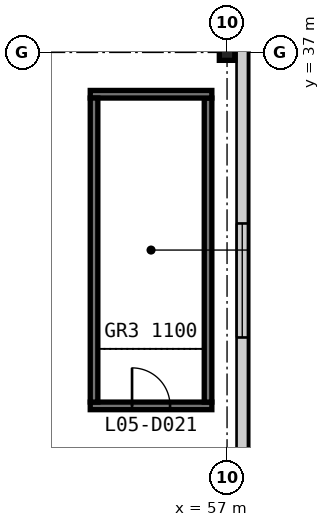
"""IFC4 building model, lengths in metres.
Left out: names, types, materials, properties, quantities, classifications, styles, units other than length and angle.
Written with IfcOpenShell. Run it as: python <this file> out.ifc"""

import sys

from ifc_helpers import new_model, si_unit, direction, frame, frame_2d, origin, origin_2d, place, context, subcontext, project, spatial, rectangle, i_section, extrude, element, fill, save


model = new_model("IFC4")
c1 = context("Model", 3, precision=1e-05, world=origin(), true_north=direction((0.0, 1.0)))
c2 = subcontext(c1, "Body", "Model", "MODEL_VIEW")
j1 = project(units=[si_unit("LENGTHUNIT", "METRE"), si_unit("PLANEANGLEUNIT", "RADIAN")], contexts=[c1])
p1 = place(None, origin())
s1 = spatial("IfcSite", under=j1, at=p1, CompositionType="ELEMENT")
p2 = place(p1, origin())
s2 = spatial("IfcBuilding", under=s1, at=p2, CompositionType="ELEMENT")
p3 = place(p2, frame((0.0, 0.0, 26.2)))
s3 = spatial("IfcBuildingStorey", under=s2, at=p3, CompositionType="ELEMENT", Elevation=26.2)
p4 = place(p3, frame((57.0, 37.0, 0.0), z_axis=(0.0, 0.0, 1.0), x_axis=(1.0, 0.0, 0.0)))
e1 = element("IfcColumn", 1, at=p4, inside=s3, PredefinedType="COLUMN", context=c2, shape_type="SweptSolid", body=[
    extrude(i_section(OverallWidth=0.406, OverallDepth=0.417, WebThickness=0.03, FlangeThickness=0.048, at=origin_2d()), origin(), (0.0, 0.0, 1.0), 4.8),
])
p5 = place(p3, frame((57.4, -7.25, 0.0), z_axis=(0.0, 0.0, 1.0), x_axis=(0.0, 1.0, 0.0)))
e2 = element("IfcWall", 2, at=p5, inside=s3, PredefinedType="SOLIDWALL", context=c2, shape_type="SweptSolid", body=[
    extrude(rectangle(XDim=72.5, YDim=0.3, at=frame_2d((36.25, 0.0))), origin(), (0.0, 0.0, 1.0), 4.5),
])
p6 = place(p5, frame((2.75, 0.0, 0.9)))
e3 = element("IfcOpeningElement", 3, at=p6, cuts=e2, PredefinedType="OPENING", context=c2, shape_type="SweptSolid", body=[
    extrude(rectangle(XDim=3.0, YDim=2.4, at=frame_2d((1.5, 1.2))), frame((0.0, 0.16, 0.0), z_axis=(0.0, -1.0, 0.0), x_axis=(1.0, 0.0, 0.0)), (0.0, 0.0, 1.0), 0.32),
])
p7 = place(p5, frame((10.75, 0.0, 0.9)))
e4 = element("IfcOpeningElement", 4, at=p7, cuts=e2, PredefinedType="OPENING", context=c2, shape_type="SweptSolid", body=[
    extrude(rectangle(XDim=3.0, YDim=2.4, at=frame_2d((1.5, 1.2))), frame((0.0, 0.16, 0.0), z_axis=(0.0, -1.0, 0.0), x_axis=(1.0, 0.0, 0.0)), (0.0, 0.0, 1.0), 0.32),
])
p8 = place(p5, frame((24.75, 0.0, 0.9)))
e5 = element("IfcOpeningElement", 5, at=p8, cuts=e2, PredefinedType="OPENING", context=c2, shape_type="SweptSolid", body=[
    extrude(rectangle(XDim=3.0, YDim=2.4, at=frame_2d((1.5, 1.2))), frame((0.0, 0.16, 0.0), z_axis=(0.0, -1.0, 0.0), x_axis=(1.0, 0.0, 0.0)), (0.0, 0.0, 1.0), 0.32),
])
p9 = place(p5, frame((36.75, 0.0, 0.9)))
e6 = element("IfcOpeningElement", 6, at=p9, cuts=e2, PredefinedType="OPENING", context=c2, shape_type="SweptSolid", body=[
    extrude(rectangle(XDim=3.0, YDim=2.4, at=frame_2d((1.5, 1.2))), frame((0.0, 0.16, 0.0), z_axis=(0.0, -1.0, 0.0), x_axis=(1.0, 0.0, 0.0)), (0.0, 0.0, 1.0), 0.32),
])
p10 = place(p5, frame((45.25, 0.0, 0.9)))
e7 = element("IfcOpeningElement", 7, at=p10, cuts=e2, PredefinedType="OPENING", context=c2, shape_type="SweptSolid", body=[
    extrude(rectangle(XDim=3.0, YDim=2.4, at=frame_2d((1.5, 1.2))), frame((0.0, 0.16, 0.0), z_axis=(0.0, -1.0, 0.0), x_axis=(1.0, 0.0, 0.0)), (0.0, 0.0, 1.0), 0.32),
])
p11 = place(p5, frame((51.25, 0.0, 0.9)))
e8 = element("IfcOpeningElement", 8, at=p11, cuts=e2, PredefinedType="OPENING", context=c2, shape_type="SweptSolid", body=[
    extrude(rectangle(XDim=3.0, YDim=2.4, at=frame_2d((1.5, 1.2))), frame((0.0, 0.16, 0.0), z_axis=(0.0, -1.0, 0.0), x_axis=(1.0, 0.0, 0.0)), (0.0, 0.0, 1.0), 0.32),
])
p12 = place(p5, frame((58.75, 0.0, 0.9)))
e9 = element("IfcOpeningElement", 9, at=p12, cuts=e2, PredefinedType="OPENING", context=c2, shape_type="SweptSolid", body=[
    extrude(rectangle(XDim=3.0, YDim=2.4, at=frame_2d((1.5, 1.2))), frame((0.0, 0.16, 0.0), z_axis=(0.0, -1.0, 0.0), x_axis=(1.0, 0.0, 0.0)), (0.0, 0.0, 1.0), 0.32),
])
p13 = place(p5, frame((66.75, 0.0, 0.9)))
e10 = element("IfcOpeningElement", 10, at=p13, cuts=e2, PredefinedType="OPENING", context=c2, shape_type="SweptSolid", body=[
    extrude(rectangle(XDim=3.0, YDim=2.4, at=frame_2d((1.5, 1.2))), frame((0.0, 0.16, 0.0), z_axis=(0.0, -1.0, 0.0), x_axis=(1.0, 0.0, 0.0)), (0.0, 0.0, 1.0), 0.32),
])
p14 = place(p3, frame((53.4, 27.7, 0.0), z_axis=(0.0, 0.0, 1.0), x_axis=(1.0, 0.0, 0.0)))
e11 = element("IfcWall", 11, at=p14, inside=s3, PredefinedType="SOLIDWALL", context=c2, shape_type="SweptSolid", body=[
    extrude(rectangle(XDim=3.2, YDim=0.2, at=frame_2d((1.6, 0.0))), origin(), (0.0, 0.0, 1.0), 4.8),
])
p15 = place(p14, frame((1.1, 0.0, 0.0)))
e12 = element("IfcOpeningElement", 12, at=p15, cuts=e11, PredefinedType="OPENING", context=c2, shape_type="SweptSolid", body=[
    extrude(rectangle(XDim=1.0, YDim=2.2, at=frame_2d((0.5, 1.1))), frame((0.0, 0.11, 0.0), z_axis=(0.0, -1.0, 0.0), x_axis=(1.0, 0.0, 0.0)), (0.0, 0.0, 1.0), 0.22),
])
p16 = place(p3, frame((56.5, 27.8, 0.0), z_axis=(0.0, 0.0, 1.0), x_axis=(0.0, 1.0, 0.0)))
e13 = element("IfcWall", 13, at=p16, inside=s3, PredefinedType="SOLIDWALL", context=c2, shape_type="SweptSolid", body=[
    extrude(rectangle(XDim=8.0, YDim=0.2, at=frame_2d((4.0, 0.0))), origin(), (0.0, 0.0, 1.0), 4.8),
])
p17 = place(p3, frame((56.6, 35.9, 0.0), z_axis=(0.0, 0.0, 1.0), x_axis=(-1.0, 0.0, 0.0)))
e14 = element("IfcWall", 14, at=p17, inside=s3, PredefinedType="SOLIDWALL", context=c2, shape_type="SweptSolid", body=[
    extrude(rectangle(XDim=3.2, YDim=0.2, at=frame_2d((1.6, 0.0))), origin(), (0.0, 0.0, 1.0), 4.8),
])
p18 = place(p3, frame((53.5, 35.8, 0.0), z_axis=(0.0, 0.0, 1.0), x_axis=(0.0, -1.0, 0.0)))
e15 = element("IfcWall", 15, at=p18, inside=s3, PredefinedType="SOLIDWALL", context=c2, shape_type="SweptSolid", body=[
    extrude(rectangle(XDim=8.0, YDim=0.2, at=frame_2d((4.0, 0.0))), origin(), (0.0, 0.0, 1.0), 4.8),
])
p19 = place(p9, origin())
e16 = element("IfcWindow", 16, at=p19, inside=s3, PartitioningType="SINGLE_PANEL", PredefinedType="WINDOW", context=c2, shape_type="SweptSolid", body=[
    extrude(rectangle(XDim=3.0, YDim=2.4, at=frame_2d((1.5, 1.2))), frame((0.0, 0.03, 0.0), z_axis=(0.0, -1.0, 0.0), x_axis=(1.0, 0.0, 0.0)), (0.0, 0.0, 1.0), 0.06),
])
fill(e6, e16)
p20 = place(p15, origin())
e17 = element("IfcDoor", 17, at=p20, inside=s3, OperationType="SINGLE_SWING_LEFT", PredefinedType="DOOR", context=c2, shape_type="SweptSolid", body=[
    extrude(rectangle(XDim=1.0, YDim=2.2, at=frame_2d((0.5, 1.1))), frame((0.0, 0.025, 0.0), z_axis=(0.0, -1.0, 0.0), x_axis=(1.0, 0.0, 0.0)), (0.0, 0.0, 1.0), 0.05),
])
fill(e12, e17)
save(model, sys.argv[1])
